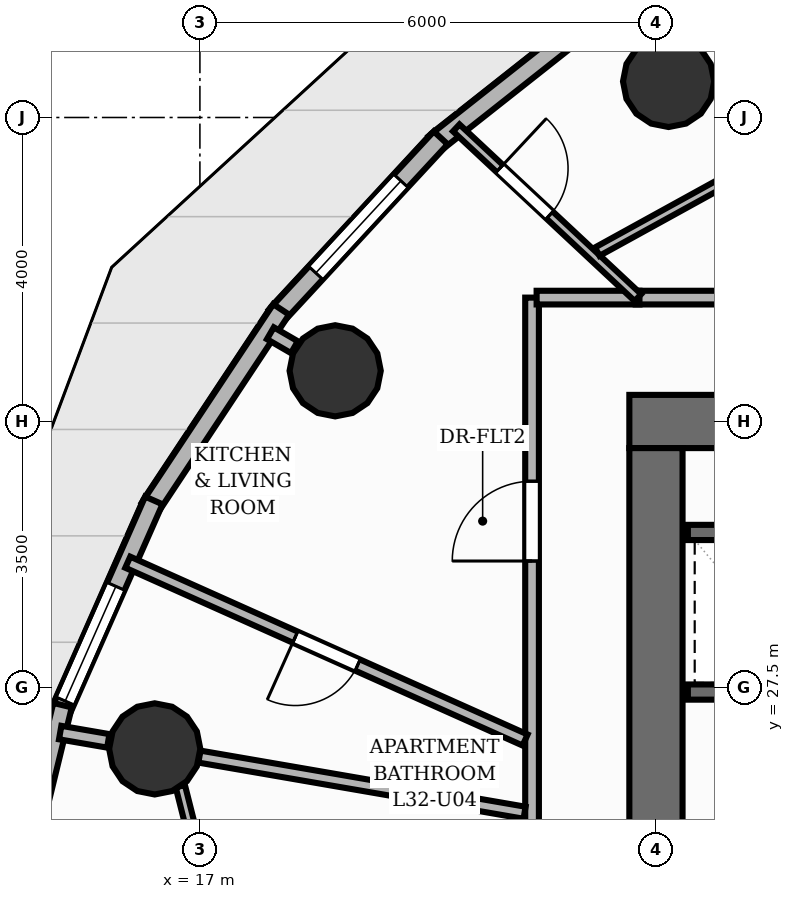
"""IFC4 building model, lengths in metres.
Left out: names, types, materials, properties, quantities, classifications, styles, units other than length and angle.
Written with IfcOpenShell. Run it as: python <this file> out.ifc"""

import sys

from ifc_helpers import new_model, si_unit, direction, frame, frame_2d, origin, origin_2d, place, context, subcontext, project, spatial, rectangle, circle, extrude, element, fill, save


model = new_model("IFC4")
c1 = context("Model", 3, precision=1e-05, world=origin(), true_north=direction((0.0, 1.0)))
c2 = subcontext(c1, "Body", "Model", "MODEL_VIEW")
j1 = project(units=[si_unit("LENGTHUNIT", "METRE"), si_unit("PLANEANGLEUNIT", "RADIAN")], contexts=[c1])
p1 = place(None, origin())
s1 = spatial("IfcSite", under=j1, at=p1, CompositionType="ELEMENT")
p2 = place(p1, origin())
s2 = spatial("IfcBuilding", under=s1, at=p2, CompositionType="ELEMENT")
p3 = place(p2, frame((0.0, 0.0, 109.28)))
s3 = spatial("IfcBuildingStorey", under=s2, at=p3, CompositionType="ELEMENT", Elevation=109.28)
p4 = place(p3, frame((22.65, 31.0, 0.0), z_axis=(0.0, 0.0, 1.0), x_axis=(1.0, 0.0, 0.0)))
e1 = element("IfcWall", 1, at=p4, inside=s3, PredefinedType="SHEAR", context=c2, shape_type="SweptSolid", body=[
    extrude(rectangle(XDim=18.7, YDim=0.7, at=frame_2d((9.35, 0.0))), origin(), (0.0, 0.0, 1.0), 3.2),
])
p5 = place(p4, frame((11.75, 0.0, 0.0)))
e2 = element("IfcOpeningElement", 2, at=p5, cuts=e1, PredefinedType="OPENING", context=c2, shape_type="SweptSolid", body=[
    extrude(rectangle(XDim=1.1, YDim=2.15, at=frame_2d((0.55, 1.075))), frame((0.0, 0.36, 0.0), z_axis=(0.0, -1.0, 0.0), x_axis=(1.0, 0.0, 0.0)), (0.0, 0.0, 1.0), 0.72),
])
p6 = place(p3, frame((23.0, 17.35, 0.0), z_axis=(0.0, 0.0, 1.0), x_axis=(0.0, 1.0, 0.0)))
e3 = element("IfcWall", 3, at=p6, inside=s3, PredefinedType="SHEAR", context=c2, shape_type="SweptSolid", body=[
    extrude(rectangle(XDim=13.3, YDim=0.7, at=frame_2d((6.65, 0.0))), origin(), (0.0, 0.0, 1.0), 3.2),
])
for number, where, z_axis, x_axis in (
    (4, (23.167, 35.474, 0.0), (0.0, 0.0, 1.0), (1.0, 0.0, 0.0)),
    (5, (18.78, 31.667, 0.0), (0.0, 0.0, 1.0), (1.0, 0.0, 0.0)),
    (6, (16.406, 26.692, 0.0), (0.0, 0.0, 1.0), (1.0, 0.0, 0.0)),
):
    element("IfcColumn", number, at=place(p3, frame(where, z_axis=z_axis, x_axis=x_axis)), inside=s3, PredefinedType="COLUMN", context=c2, shape_type="SweptSolid", body=[
        extrude(circle(Radius=0.6, at=origin_2d()), origin(), (0.0, 0.0, 1.0), 3.2),
    ])
p7 = place(p3, frame((20.088, 34.658, 0.0), z_axis=(0.0, 0.0, 1.0), x_axis=(0.784871179145, 0.619658964389, 0.0)))
e7 = element("IfcWall", 7, at=p7, inside=s3, PredefinedType="SOLIDWALL", context=c2, shape_type="SweptSolid", body=[
    extrude(rectangle(XDim=3.236, YDim=0.25, at=frame_2d((1.618, 0.0))), origin(), (0.0, 0.0, 1.0), 2.8),
])
p8 = place(p3, frame((18.001, 32.388, 0.0), z_axis=(0.0, 0.0, 1.0), x_axis=(0.678956449941, 0.734178547142, 0.0)))
e8 = element("IfcWall", 8, at=p8, inside=s3, PredefinedType="SOLIDWALL", context=c2, shape_type="SweptSolid", body=[
    extrude(rectangle(XDim=3.192, YDim=0.25, at=frame_2d((1.596, 0.0))), origin(), (0.0, 0.0, 1.0), 2.8),
])
p9 = place(p8, frame((0.771, 0.0, 0.85)))
e9 = element("IfcOpeningElement", 9, at=p9, cuts=e8, PredefinedType="OPENING", context=c2, shape_type="SweptSolid", body=[
    extrude(rectangle(XDim=1.65, YDim=1.55, at=frame_2d((0.825, 0.775))), frame((0.0, 0.135, 0.0), z_axis=(0.0, -1.0, 0.0), x_axis=(1.0, 0.0, 0.0)), (0.0, 0.0, 1.0), 0.27),
])
p10 = place(p3, frame((16.341, 29.864, 0.0), z_axis=(0.0, 0.0, 1.0), x_axis=(0.552034347266, 0.833821371421, 0.0)))
e10 = element("IfcWall", 10, at=p10, inside=s3, PredefinedType="SOLIDWALL", context=c2, shape_type="SweptSolid", body=[
    extrude(rectangle(XDim=3.131, YDim=0.25, at=frame_2d((1.565, 0.0))), origin(), (0.0, 0.0, 1.0), 2.8),
])
p11 = place(p3, frame((15.157, 27.162, 0.0), z_axis=(0.0, 0.0, 1.0), x_axis=(0.404109525311, 0.914710605357, 0.0)))
e11 = element("IfcWall", 11, at=p11, inside=s3, PredefinedType="SOLIDWALL", context=c2, shape_type="SweptSolid", body=[
    extrude(rectangle(XDim=3.061, YDim=0.25, at=frame_2d((1.53, 0.0))), origin(), (0.0, 0.0, 1.0), 2.8),
])
p12 = place(p11, frame((0.175, 0.0, 0.85)))
e12 = element("IfcOpeningElement", 12, at=p12, cuts=e11, PredefinedType="OPENING", context=c2, shape_type="SweptSolid", body=[
    extrude(rectangle(XDim=1.65, YDim=1.55, at=frame_2d((0.825, 0.775))), frame((0.0, 0.135, 0.0), z_axis=(0.0, -1.0, 0.0), x_axis=(1.0, 0.0, 0.0)), (0.0, 0.0, 1.0), 0.27),
])
p13 = place(p3, frame((14.486, 24.364, 0.0), z_axis=(0.0, 0.0, 1.0), x_axis=(0.236668427837, 0.971590477138, 0.0)))
e13 = element("IfcWall", 13, at=p13, inside=s3, PredefinedType="SOLIDWALL", context=c2, shape_type="SweptSolid", body=[
    extrude(rectangle(XDim=2.989, YDim=0.25, at=frame_2d((1.494, 0.0))), origin(), (0.0, 0.0, 1.0), 2.8),
])
for number, where, z_axis, x_axis in (
    (14, (23.42, 29.54, 0.0), (0.0, 0.0, 1.0), (1.0, 0.0, 0.0)),
    (15, (23.42, 27.44, 0.0), (0.0, 0.0, 1.0), (1.0, 0.0, 0.0)),
):
    element("IfcWall", number, at=place(p3, frame(where, z_axis=z_axis, x_axis=x_axis)), inside=s3, PredefinedType="SHEAR", context=c2, shape_type="SweptSolid", body=[
        extrude(rectangle(XDim=1.71, YDim=0.2, at=frame_2d((0.855, 0.0))), origin(), (0.0, 0.0, 1.0), 3.2),
    ])
p14 = place(p3, frame((18.243, 31.978, 0.0), z_axis=(0.0, 0.0, 1.0), x_axis=(-0.864891917132, 0.501958137377, 0.0)))
e16 = element("IfcWall", 16, at=p14, inside=s3, PredefinedType="PARTITIONING", context=c2, shape_type="SweptSolid", body=[
    extrude(rectangle(XDim=0.365, YDim=0.18, at=frame_2d((0.183, 0.0))), origin(), (0.0, 0.0, 1.0), 2.1),
])
p15 = place(p3, frame((15.794, 26.798, 0.0), z_axis=(0.0, 0.0, 1.0), x_axis=(-0.985389793052, 0.170314285219, 0.0)))
e17 = element("IfcWall", 17, at=p15, inside=s3, PredefinedType="PARTITIONING", context=c2, shape_type="SweptSolid", body=[
    extrude(rectangle(XDim=0.642, YDim=0.18, at=frame_2d((0.321, 0.0))), origin(), (0.0, 0.0, 1.0), 2.1),
])
p16 = place(p3, frame((22.734, 32.63, 0.0), z_axis=(0.0, 0.0, 1.0), x_axis=(1.0, 0.0, 0.0)))
e18 = element("IfcWall", 18, at=p16, inside=s3, PredefinedType="PARTITIONING", context=c2, shape_type="SweptSolid", body=[
    extrude(rectangle(XDim=19.896, YDim=0.18, at=frame_2d((9.948, 0.0))), origin(), (0.0, 0.0, 1.0), 2.795),
])
p17 = place(p16, frame((11.004, 0.0, 0.0)))
e19 = element("IfcOpeningElement", 19, at=p17, cuts=e18, PredefinedType="OPENING", context=c2, shape_type="SweptSolid", body=[
    extrude(rectangle(XDim=1.05, YDim=2.0, at=frame_2d((0.525, 1.0))), frame((0.0, 0.1, 0.0), z_axis=(0.0, -1.0, 0.0), x_axis=(1.0, 0.0, 0.0)), (0.0, 0.0, 1.0), 0.2),
])
p18 = place(p3, frame((21.37, 15.37, 0.0), z_axis=(0.0, 0.0, 1.0), x_axis=(0.0, 1.0, 0.0)))
e20 = element("IfcWall", 20, at=p18, inside=s3, PredefinedType="PARTITIONING", context=c2, shape_type="SweptSolid", body=[
    extrude(rectangle(XDim=17.26, YDim=0.18, at=frame_2d((8.63, 0.0))), origin(), (0.0, 0.0, 1.0), 2.795),
])
p19 = place(p18, frame((13.794, 0.0, 0.0)))
e21 = element("IfcOpeningElement", 21, at=p19, cuts=e20, PredefinedType="OPENING", context=c2, shape_type="SweptSolid", body=[
    extrude(rectangle(XDim=1.05, YDim=2.0, at=frame_2d((0.525, 1.0))), frame((0.0, 0.1, 0.0), z_axis=(0.0, -1.0, 0.0), x_axis=(1.0, 0.0, 0.0)), (0.0, 0.0, 1.0), 0.2),
])
p20 = place(p3, frame((21.43, 32.63, 0.0), z_axis=(0.0, 0.0, 1.0), x_axis=(1.0, 0.0, 0.0)))
e22 = element("IfcWall", 22, at=p20, inside=s3, PredefinedType="PARTITIONING", context=c2, shape_type="SweptSolid", body=[
    extrude(rectangle(XDim=1.353, YDim=0.18, at=frame_2d((0.677, 0.0))), origin(), (0.0, 0.0, 1.0), 2.795),
])
p21 = place(p3, frame((21.279, 26.809, 0.0), z_axis=(0.0, 0.0, 1.0), x_axis=(-0.912794415037, 0.408419338275, 0.0)))
e23 = element("IfcWall", 23, at=p21, inside=s3, PredefinedType="PLUMBINGWALL", context=c2, shape_type="SweptSolid", body=[
    extrude(rectangle(XDim=5.727, YDim=0.16, at=frame_2d((2.864, 0.0))), origin(), (0.0, 0.0, 1.0), 2.481),
])
p22 = place(p21, frame((2.414, 0.0, 0.0)))
e24 = element("IfcOpeningElement", 24, at=p22, cuts=e23, PredefinedType="OPENING", context=c2, shape_type="SweptSolid", body=[
    extrude(rectangle(XDim=0.9, YDim=2.1, at=frame_2d((0.45, 1.05))), frame((0.0, 0.09, 0.0), z_axis=(0.0, -1.0, 0.0), x_axis=(1.0, 0.0, 0.0)), (0.0, 0.0, 1.0), 0.18),
])
p23 = place(p3, frame((20.373, 34.863, 0.0), z_axis=(0.0, 0.0, 1.0), x_axis=(0.730692833249, -0.682706366924, 0.0)))
e25 = element("IfcWall", 25, at=p23, inside=s3, PredefinedType="PARTITIONING", context=c2, shape_type="SweptSolid", body=[
    extrude(rectangle(XDim=3.271, YDim=0.125, at=frame_2d((1.636, 0.0))), origin(), (0.0, 0.0, 1.0), 2.795),
])
p24 = place(p23, frame((0.781, 0.0, 0.0)))
e26 = element("IfcOpeningElement", 26, at=p24, cuts=e25, PredefinedType="OPENING", context=c2, shape_type="SweptSolid", body=[
    extrude(rectangle(XDim=0.9, YDim=2.1, at=frame_2d((0.45, 1.05))), frame((0.0, 0.073, 0.0), z_axis=(0.0, -1.0, 0.0), x_axis=(1.0, 0.0, 0.0)), (0.0, 0.0, 1.0), 0.145),
])
p25 = place(p3, frame((21.271, 25.852, 0.0), z_axis=(0.0, 0.0, 1.0), x_axis=(-0.985414949705, 0.170168671906, 0.0)))
e27 = element("IfcWall", 27, at=p25, inside=s3, PredefinedType="PLUMBINGWALL", context=c2, shape_type="SweptSolid", body=[
    extrude(rectangle(XDim=4.341, YDim=0.16, at=frame_2d((2.171, 0.0))), origin(), (0.0, 0.0, 1.0), 2.1),
])
p26 = place(p3, frame((28.894, 36.907, 0.0), z_axis=(0.0, 0.0, 1.0), x_axis=(-0.875900786778, -0.482491255591, 0.0)))
e28 = element("IfcWall", 28, at=p26, inside=s3, PredefinedType="PARTITIONING", context=c2, shape_type="SweptSolid", body=[
    extrude(rectangle(XDim=7.611, YDim=0.125, at=frame_2d((3.805, 0.0))), origin(), (0.0, 0.0, 1.0), 2.795),
])
p27 = place(p26, frame((3.355, 0.0, 0.0)))
e29 = element("IfcOpeningElement", 29, at=p27, cuts=e28, PredefinedType="OPENING", context=c2, shape_type="SweptSolid", body=[
    extrude(rectangle(XDim=0.9, YDim=2.1, at=frame_2d((0.45, 1.05))), frame((0.0, 0.073, 0.0), z_axis=(0.0, -1.0, 0.0), x_axis=(1.0, 0.0, 0.0)), (0.0, 0.0, 1.0), 0.145),
])
p28 = place(p3, frame((19.111, 16.826, 0.0), z_axis=(0.0, 0.0, 1.0), x_axis=(-0.244982180272, 0.969527581531, 0.0)))
e30 = element("IfcWall", 30, at=p28, inside=s3, PredefinedType="PARTITIONING", context=c2, shape_type="SweptSolid", body=[
    extrude(rectangle(XDim=9.671, YDim=0.125, at=frame_2d((4.835, 0.0))), origin(), (0.0, 0.0, 1.0), 2.795),
])
p29 = place(p28, frame((3.265, 0.0, 0.0)))
e31 = element("IfcOpeningElement", 31, at=p29, cuts=e30, PredefinedType="OPENING", context=c2, shape_type="SweptSolid", body=[
    extrude(rectangle(XDim=0.9, YDim=2.1, at=frame_2d((0.45, 1.05))), frame((0.0, 0.073, 0.0), z_axis=(0.0, -1.0, 0.0), x_axis=(1.0, 0.0, 0.0)), (0.0, 0.0, 1.0), 0.145),
])
p30 = place(p9, origin())
e32 = element("IfcWindow", 32, at=p30, inside=s3, PartitioningType="SINGLE_PANEL", PredefinedType="WINDOW", context=c2, shape_type="SweptSolid", body=[
    extrude(rectangle(XDim=1.65, YDim=1.55, at=frame_2d((0.825, 0.775))), frame((0.0, 0.03, 0.0), z_axis=(0.0, -1.0, 0.0), x_axis=(1.0, 0.0, 0.0)), (0.0, 0.0, 1.0), 0.06),
])
fill(e9, e32)
p31 = place(p12, origin())
e33 = element("IfcWindow", 33, at=p31, inside=s3, PartitioningType="SINGLE_PANEL", PredefinedType="WINDOW", context=c2, shape_type="SweptSolid", body=[
    extrude(rectangle(XDim=1.65, YDim=1.55, at=frame_2d((0.825, 0.775))), frame((0.0, 0.03, 0.0), z_axis=(0.0, -1.0, 0.0), x_axis=(1.0, 0.0, 0.0)), (0.0, 0.0, 1.0), 0.06),
])
fill(e12, e33)
p32 = place(p19, origin())
e34 = element("IfcDoor", 34, at=p32, inside=s3, OperationType="SINGLE_SWING_LEFT", PredefinedType="DOOR", context=c2, shape_type="SweptSolid", body=[
    extrude(rectangle(XDim=1.05, YDim=2.0, at=frame_2d((0.525, 1.0))), frame((0.0, 0.025, 0.0), z_axis=(0.0, -1.0, 0.0), x_axis=(1.0, 0.0, 0.0)), (0.0, 0.0, 1.0), 0.05),
])
fill(e21, e34)
p33 = place(p22, origin())
e35 = element("IfcDoor", 35, at=p33, inside=s3, OperationType="SINGLE_SWING_RIGHT", PredefinedType="DOOR", context=c2, shape_type="SweptSolid", body=[
    extrude(rectangle(XDim=0.9, YDim=2.1, at=frame_2d((0.45, 1.05))), frame((0.0, 0.025, 0.0), z_axis=(0.0, -1.0, 0.0), x_axis=(1.0, 0.0, 0.0)), (0.0, 0.0, 1.0), 0.05),
])
fill(e24, e35)
p34 = place(p24, origin())
e36 = element("IfcDoor", 36, at=p34, inside=s3, OperationType="SINGLE_SWING_LEFT", PredefinedType="DOOR", context=c2, shape_type="SweptSolid", body=[
    extrude(rectangle(XDim=0.9, YDim=2.1, at=frame_2d((0.45, 1.05))), frame((0.0, 0.025, 0.0), z_axis=(0.0, -1.0, 0.0), x_axis=(1.0, 0.0, 0.0)), (0.0, 0.0, 1.0), 0.05),
])
fill(e26, e36)
save(model, sys.argv[1])
